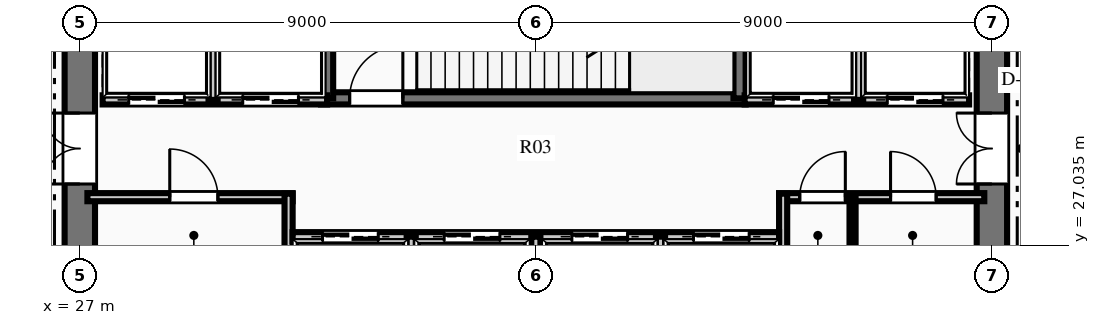
"""IFC4 building model, lengths in metres.
Left out: names, types, materials, properties, quantities, classifications, styles, units other than length and angle.
Written with IfcOpenShell. Run it as: python <this file> out.ifc"""

import sys

from ifc_helpers import new_model, si_unit, direction, frame, frame_2d, origin, place, context, subcontext, project, spatial, rectangle, extrude, element, fill, save


model = new_model("IFC4")
c1 = context("Model", 3, precision=1e-05, world=origin(), true_north=direction((0.0, 1.0)))
c2 = subcontext(c1, "Body", "Model", "MODEL_VIEW")
j1 = project(units=[si_unit("LENGTHUNIT", "METRE"), si_unit("PLANEANGLEUNIT", "RADIAN")], contexts=[c1])
p1 = place(None, origin())
s1 = spatial("IfcSite", under=j1, at=p1, CompositionType="ELEMENT")
p2 = place(p1, origin())
s2 = spatial("IfcBuilding", under=s1, at=p2, CompositionType="ELEMENT")
p3 = place(p2, frame((0.0, 0.0, 16.8)))
s3 = spatial("IfcBuildingStorey", under=s2, at=p3, CompositionType="ELEMENT", Elevation=16.8)
p4 = place(p3, frame((27.0, 18.3, 0.0), z_axis=(0.0, 0.0, 1.0), x_axis=(0.0, 1.0, 0.0)))
e1 = element("IfcWall", 1, at=p4, inside=s3, PredefinedType="SHEAR", context=c2, shape_type="SweptSolid", body=[
    extrude(rectangle(XDim=15.4, YDim=0.6, at=frame_2d((7.7, 0.0))), origin(), (0.0, 0.0, 1.0), 5.4),
])
p5 = place(p4, frame((9.94, 0.0, 0.0)))
e2 = element("IfcOpeningElement", 2, at=p5, cuts=e1, PredefinedType="OPENING", context=c2, shape_type="SweptSolid", body=[
    extrude(rectangle(XDim=1.4, YDim=2.2, at=frame_2d((0.7, 1.1))), frame((0.0, 0.31, 0.0), z_axis=(0.0, -1.0, 0.0), x_axis=(1.0, 0.0, 0.0)), (0.0, 0.0, 1.0), 0.62),
])
p6 = place(p3, frame((45.0, 18.3, 0.0), z_axis=(0.0, 0.0, 1.0), x_axis=(0.0, 1.0, 0.0)))
e3 = element("IfcWall", 3, at=p6, inside=s3, PredefinedType="SHEAR", context=c2, shape_type="SweptSolid", body=[
    extrude(rectangle(XDim=15.4, YDim=0.6, at=frame_2d((7.7, 0.0))), origin(), (0.0, 0.0, 1.0), 5.4),
])
p7 = place(p6, frame((9.94, 0.0, 0.0)))
e4 = element("IfcOpeningElement", 4, at=p7, cuts=e3, PredefinedType="OPENING", context=c2, shape_type="SweptSolid", body=[
    extrude(rectangle(XDim=1.4, YDim=2.2, at=frame_2d((0.7, 1.1))), frame((0.0, 0.31, 0.0), z_axis=(0.0, -1.0, 0.0), x_axis=(1.0, 0.0, 0.0)), (0.0, 0.0, 1.0), 0.62),
])
p8 = place(p3, frame((31.76, 29.93, 0.0), z_axis=(0.0, 0.0, 1.0), x_axis=(1.0, 0.0, 0.0)))
e5 = element("IfcWall", 5, at=p8, inside=s3, PredefinedType="SHEAR", context=c2, shape_type="SweptSolid", body=[
    extrude(rectangle(XDim=8.38, YDim=0.24, at=frame_2d((4.19, 0.0))), origin(), (0.0, 0.0, 1.0), 5.4),
])
p9 = place(p8, frame((0.565, 0.0, 0.0)))
e6 = element("IfcOpeningElement", 6, at=p9, cuts=e5, PredefinedType="OPENING", context=c2, shape_type="SweptSolid", body=[
    extrude(rectangle(XDim=1.05, YDim=2.15, at=frame_2d((0.525, 1.075))), frame((0.0, 0.13, 0.0), z_axis=(0.0, -1.0, 0.0), x_axis=(1.0, 0.0, 0.0)), (0.0, 0.0, 1.0), 0.26),
])
p10 = place(p3, frame((31.88, 29.93, 0.0), z_axis=(0.0, 0.0, 1.0), x_axis=(0.0, 1.0, 0.0)))
e7 = element("IfcWall", 7, at=p10, inside=s3, PredefinedType="SHEAR", context=c2, shape_type="SweptSolid", body=[
    extrude(rectangle(XDim=3.79, YDim=0.24, at=frame_2d((1.895, 0.0))), origin(), (0.0, 0.0, 1.0), 5.4),
])
p11 = place(p3, frame((40.02, 29.93, 0.0), z_axis=(0.0, 0.0, 1.0), x_axis=(0.0, 1.0, 0.0)))
e8 = element("IfcWall", 8, at=p11, inside=s3, PredefinedType="SHEAR", context=c2, shape_type="SweptSolid", body=[
    extrude(rectangle(XDim=3.85, YDim=0.24, at=frame_2d((1.925, 0.0))), origin(), (0.0, 0.0, 1.0), 5.4),
])
p12 = place(p3, frame((27.15, 27.98, 0.0), z_axis=(0.0, 0.0, 1.0), x_axis=(1.0, 0.0, 0.0)))
e9 = element("IfcWall", 9, at=p12, inside=s3, PredefinedType="PARTITIONING", context=c2, shape_type="SweptSolid", body=[
    extrude(rectangle(XDim=4.05, YDim=0.16, at=frame_2d((2.025, 0.0))), origin(), (0.0, 0.0, 1.0), 4.98),
])
p13 = place(p12, frame((1.625, 0.0, 0.0)))
e10 = element("IfcOpeningElement", 10, at=p13, cuts=e9, PredefinedType="OPENING", context=c2, shape_type="SweptSolid", body=[
    extrude(rectangle(XDim=0.95, YDim=2.15, at=frame_2d((0.475, 1.075))), frame((0.0, 0.09, 0.0), z_axis=(0.0, -1.0, 0.0), x_axis=(1.0, 0.0, 0.0)), (0.0, 0.0, 1.0), 0.18),
])
p14 = place(p3, frame((31.12, 26.54, 0.0), z_axis=(0.0, 0.0, 1.0), x_axis=(0.0, 1.0, 0.0)))
e11 = element("IfcWall", 11, at=p14, inside=s3, PredefinedType="PARTITIONING", context=c2, shape_type="SweptSolid", body=[
    extrude(rectangle(XDim=1.51, YDim=0.16, at=frame_2d((0.755, 0.0))), origin(), (0.0, 0.0, 1.0), 4.98),
])
p15 = place(p3, frame((40.8, 27.98, 0.0), z_axis=(0.0, 0.0, 1.0), x_axis=(1.0, 0.0, 0.0)))
e12 = element("IfcWall", 12, at=p15, inside=s3, PredefinedType="PARTITIONING", context=c2, shape_type="SweptSolid", body=[
    extrude(rectangle(XDim=4.05, YDim=0.16, at=frame_2d((2.025, 0.0))), origin(), (0.0, 0.0, 1.0), 4.98),
])
p16 = place(p15, frame((0.407, 0.0, 0.0)))
e13 = element("IfcOpeningElement", 13, at=p16, cuts=e12, PredefinedType="OPENING", context=c2, shape_type="SweptSolid", body=[
    extrude(rectangle(XDim=0.9, YDim=2.15, at=frame_2d((0.45, 1.075))), frame((0.0, 0.09, 0.0), z_axis=(0.0, -1.0, 0.0), x_axis=(1.0, 0.0, 0.0)), (0.0, 0.0, 1.0), 0.18),
])
p17 = place(p15, frame((2.2, 0.0, 0.0)))
e14 = element("IfcOpeningElement", 14, at=p17, cuts=e12, PredefinedType="OPENING", context=c2, shape_type="SweptSolid", body=[
    extrude(rectangle(XDim=0.9, YDim=2.15, at=frame_2d((0.45, 1.075))), frame((0.0, 0.09, 0.0), z_axis=(0.0, -1.0, 0.0), x_axis=(1.0, 0.0, 0.0)), (0.0, 0.0, 1.0), 0.18),
])
p18 = place(p3, frame((40.88, 26.54, 0.0), z_axis=(0.0, 0.0, 1.0), x_axis=(0.0, 1.0, 0.0)))
e15 = element("IfcWall", 15, at=p18, inside=s3, PredefinedType="PARTITIONING", context=c2, shape_type="SweptSolid", body=[
    extrude(rectangle(XDim=1.51, YDim=0.16, at=frame_2d((0.755, 0.0))), origin(), (0.0, 0.0, 1.0), 4.98),
])
p19 = place(p3, frame((42.25, 26.54, 0.0), z_axis=(0.0, 0.0, 1.0), x_axis=(0.0, 1.0, 0.0)))
e16 = element("IfcWall", 16, at=p19, inside=s3, PredefinedType="PARTITIONING", context=c2, shape_type="SweptSolid", body=[
    extrude(rectangle(XDim=1.44, YDim=0.12, at=frame_2d((0.72, 0.0))), origin(), (0.0, 0.0, 1.0), 4.98),
])
p20 = place(p3, frame((27.45, 29.9, 0.0), z_axis=(0.0, 0.0, 1.0), x_axis=(1.0, 0.0, 0.0)))
e17 = element("IfcWall", 17, at=p20, inside=s3, PredefinedType="PARTITIONING", context=c2, shape_type="SweptSolid", body=[
    extrude(rectangle(XDim=4.43, YDim=0.18, at=frame_2d((2.215, 0.0))), origin(), (0.0, 0.0, 1.0), 4.98),
])
p21 = place(p20, frame((0.515, 0.0, 0.0)))
e18 = element("IfcOpeningElement", 18, at=p21, cuts=e17, PredefinedType="OPENING", context=c2, shape_type="SweptSolid", body=[
    extrude(rectangle(XDim=1.1, YDim=2.15, at=frame_2d((0.55, 1.075))), frame((0.0, 0.1, 0.0), z_axis=(0.0, -1.0, 0.0), x_axis=(1.0, 0.0, 0.0)), (0.0, 0.0, 1.0), 0.2),
])
p22 = place(p20, frame((2.765, 0.0, 0.0)))
e19 = element("IfcOpeningElement", 19, at=p22, cuts=e17, PredefinedType="OPENING", context=c2, shape_type="SweptSolid", body=[
    extrude(rectangle(XDim=1.1, YDim=2.15, at=frame_2d((0.55, 1.075))), frame((0.0, 0.1, 0.0), z_axis=(0.0, -1.0, 0.0), x_axis=(1.0, 0.0, 0.0)), (0.0, 0.0, 1.0), 0.2),
])
p23 = place(p3, frame((29.63, 29.9, 0.0), z_axis=(0.0, 0.0, 1.0), x_axis=(0.0, 1.0, 0.0)))
e20 = element("IfcWall", 20, at=p23, inside=s3, PredefinedType="PARTITIONING", context=c2, shape_type="SweptSolid", body=[
    extrude(rectangle(XDim=3.75, YDim=0.18, at=frame_2d((1.875, 0.0))), origin(), (0.0, 0.0, 1.0), 4.98),
])
p24 = place(p3, frame((40.12, 29.9, 0.0), z_axis=(0.0, 0.0, 1.0), x_axis=(1.0, 0.0, 0.0)))
e21 = element("IfcWall", 21, at=p24, inside=s3, PredefinedType="PARTITIONING", context=c2, shape_type="SweptSolid", body=[
    extrude(rectangle(XDim=4.43, YDim=0.18, at=frame_2d((2.215, 0.0))), origin(), (0.0, 0.0, 1.0), 4.98),
])
p25 = place(p24, frame((0.565, 0.0, 0.0)))
e22 = element("IfcOpeningElement", 22, at=p25, cuts=e21, PredefinedType="OPENING", context=c2, shape_type="SweptSolid", body=[
    extrude(rectangle(XDim=1.1, YDim=2.15, at=frame_2d((0.55, 1.075))), frame((0.0, 0.1, 0.0), z_axis=(0.0, -1.0, 0.0), x_axis=(1.0, 0.0, 0.0)), (0.0, 0.0, 1.0), 0.2),
])
p26 = place(p24, frame((2.815, 0.0, 0.0)))
e23 = element("IfcOpeningElement", 23, at=p26, cuts=e21, PredefinedType="OPENING", context=c2, shape_type="SweptSolid", body=[
    extrude(rectangle(XDim=1.1, YDim=2.15, at=frame_2d((0.55, 1.075))), frame((0.0, 0.1, 0.0), z_axis=(0.0, -1.0, 0.0), x_axis=(1.0, 0.0, 0.0)), (0.0, 0.0, 1.0), 0.2),
])
p27 = place(p3, frame((42.37, 29.9, 0.0), z_axis=(0.0, 0.0, 1.0), x_axis=(0.0, 1.0, 0.0)))
e24 = element("IfcWall", 24, at=p27, inside=s3, PredefinedType="PARTITIONING", context=c2, shape_type="SweptSolid", body=[
    extrude(rectangle(XDim=3.75, YDim=0.18, at=frame_2d((1.875, 0.0))), origin(), (0.0, 0.0, 1.0), 4.98),
])
p28 = place(p3, frame((31.2, 27.2, 0.0), z_axis=(0.0, 0.0, 1.0), x_axis=(1.0, 0.0, 0.0)))
e25 = element("IfcWall", 25, at=p28, inside=s3, PredefinedType="PARTITIONING", context=c2, shape_type="SweptSolid", body=[
    extrude(rectangle(XDim=9.6, YDim=0.18, at=frame_2d((4.8, 0.0))), origin(), (0.0, 0.0, 1.0), 4.98),
])
p29 = place(p28, frame((0.59, 0.0, 0.0)))
e26 = element("IfcOpeningElement", 26, at=p29, cuts=e25, PredefinedType="OPENING", context=c2, shape_type="SweptSolid", body=[
    extrude(rectangle(XDim=1.1, YDim=2.15, at=frame_2d((0.55, 1.075))), frame((0.0, 0.1, 0.0), z_axis=(0.0, -1.0, 0.0), x_axis=(1.0, 0.0, 0.0)), (0.0, 0.0, 1.0), 0.2),
])
p30 = place(p28, frame((2.99, 0.0, 0.0)))
e27 = element("IfcOpeningElement", 27, at=p30, cuts=e25, PredefinedType="OPENING", context=c2, shape_type="SweptSolid", body=[
    extrude(rectangle(XDim=1.1, YDim=2.15, at=frame_2d((0.55, 1.075))), frame((0.0, 0.1, 0.0), z_axis=(0.0, -1.0, 0.0), x_axis=(1.0, 0.0, 0.0)), (0.0, 0.0, 1.0), 0.2),
])
p31 = place(p28, frame((5.51, 0.0, 0.0)))
e28 = element("IfcOpeningElement", 28, at=p31, cuts=e25, PredefinedType="OPENING", context=c2, shape_type="SweptSolid", body=[
    extrude(rectangle(XDim=1.1, YDim=2.15, at=frame_2d((0.55, 1.075))), frame((0.0, 0.1, 0.0), z_axis=(0.0, -1.0, 0.0), x_axis=(1.0, 0.0, 0.0)), (0.0, 0.0, 1.0), 0.2),
])
p32 = place(p28, frame((7.91, 0.0, 0.0)))
e29 = element("IfcOpeningElement", 29, at=p32, cuts=e25, PredefinedType="OPENING", context=c2, shape_type="SweptSolid", body=[
    extrude(rectangle(XDim=1.1, YDim=2.15, at=frame_2d((0.55, 1.075))), frame((0.0, 0.1, 0.0), z_axis=(0.0, -1.0, 0.0), x_axis=(1.0, 0.0, 0.0)), (0.0, 0.0, 1.0), 0.2),
])
for number, where, z_axis, x_axis in (
    (30, (33.54, 25.3, 0.0), (0.0, 0.0, 1.0), (0.0, 1.0, 0.0)),
    (31, (36.0, 25.3, 0.0), (0.0, 0.0, 1.0), (0.0, 1.0, 0.0)),
    (32, (38.46, 25.3, 0.0), (0.0, 0.0, 1.0), (0.0, 1.0, 0.0)),
):
    element("IfcWall", number, at=place(p3, frame(where, z_axis=z_axis, x_axis=x_axis)), inside=s3, PredefinedType="PARTITIONING", context=c2, shape_type="SweptSolid", body=[
        extrude(rectangle(XDim=1.9, YDim=0.18, at=frame_2d((0.95, 0.0))), origin(), (0.0, 0.0, 1.0), 4.98),
    ])
p33 = place(p13, origin())
e33 = element("IfcDoor", 33, at=p33, inside=s3, OperationType="SINGLE_SWING_LEFT", PredefinedType="DOOR", context=c2, shape_type="SweptSolid", body=[
    extrude(rectangle(XDim=0.95, YDim=2.15, at=frame_2d((0.475, 1.075))), frame((0.0, 0.025, 0.0), z_axis=(0.0, -1.0, 0.0), x_axis=(1.0, 0.0, 0.0)), (0.0, 0.0, 1.0), 0.05),
])
fill(e10, e33)
p34 = place(p16, origin())
e34 = element("IfcDoor", 34, at=p34, inside=s3, OperationType="SINGLE_SWING_RIGHT", PredefinedType="DOOR", context=c2, shape_type="SweptSolid", body=[
    extrude(rectangle(XDim=0.9, YDim=2.15, at=frame_2d((0.45, 1.075))), frame((0.0, 0.025, 0.0), z_axis=(0.0, -1.0, 0.0), x_axis=(1.0, 0.0, 0.0)), (0.0, 0.0, 1.0), 0.05),
])
fill(e13, e34)
p35 = place(p17, origin())
e35 = element("IfcDoor", 35, at=p35, inside=s3, OperationType="SINGLE_SWING_LEFT", PredefinedType="DOOR", context=c2, shape_type="SweptSolid", body=[
    extrude(rectangle(XDim=0.9, YDim=2.15, at=frame_2d((0.45, 1.075))), frame((0.0, 0.025, 0.0), z_axis=(0.0, -1.0, 0.0), x_axis=(1.0, 0.0, 0.0)), (0.0, 0.0, 1.0), 0.05),
])
fill(e14, e35)
p36 = place(p9, origin())
e36 = element("IfcDoor", 36, at=p36, inside=s3, OperationType="SINGLE_SWING_RIGHT", PredefinedType="DOOR", context=c2, shape_type="SweptSolid", body=[
    extrude(rectangle(XDim=1.05, YDim=2.15, at=frame_2d((0.525, 1.075))), frame((0.0, 0.025, 0.0), z_axis=(0.0, -1.0, 0.0), x_axis=(1.0, 0.0, 0.0)), (0.0, 0.0, 1.0), 0.05),
])
fill(e6, e36)
p37 = place(p5, origin())
e37 = element("IfcDoor", 37, at=p37, inside=s3, OperationType="DOUBLE_DOOR_SINGLE_SWING", PredefinedType="DOOR", context=c2, shape_type="SweptSolid", body=[
    extrude(rectangle(XDim=1.4, YDim=2.2, at=frame_2d((0.7, 1.1))), frame((0.0, 0.025, 0.0), z_axis=(0.0, -1.0, 0.0), x_axis=(1.0, 0.0, 0.0)), (0.0, 0.0, 1.0), 0.05),
])
fill(e2, e37)
p38 = place(p7, origin())
e38 = element("IfcDoor", 38, at=p38, inside=s3, OperationType="DOUBLE_DOOR_SINGLE_SWING", PredefinedType="DOOR", context=c2, shape_type="SweptSolid", body=[
    extrude(rectangle(XDim=1.4, YDim=2.2, at=frame_2d((0.7, 1.1))), frame((0.0, 0.025, 0.0), z_axis=(0.0, -1.0, 0.0), x_axis=(1.0, 0.0, 0.0)), (0.0, 0.0, 1.0), 0.05),
])
fill(e4, e38)
p39 = place(p21, origin())
e39 = element("IfcDoor", 39, at=p39, inside=s3, OperationType="SLIDING_TO_LEFT", PredefinedType="DOOR", context=c2, shape_type="SweptSolid", body=[
    extrude(rectangle(XDim=1.1, YDim=2.15, at=frame_2d((0.55, 1.075))), frame((0.0, 0.025, 0.0), z_axis=(0.0, -1.0, 0.0), x_axis=(1.0, 0.0, 0.0)), (0.0, 0.0, 1.0), 0.05),
])
fill(e18, e39)
p40 = place(p22, origin())
e40 = element("IfcDoor", 40, at=p40, inside=s3, OperationType="SLIDING_TO_LEFT", PredefinedType="DOOR", context=c2, shape_type="SweptSolid", body=[
    extrude(rectangle(XDim=1.1, YDim=2.15, at=frame_2d((0.55, 1.075))), frame((0.0, 0.025, 0.0), z_axis=(0.0, -1.0, 0.0), x_axis=(1.0, 0.0, 0.0)), (0.0, 0.0, 1.0), 0.05),
])
fill(e19, e40)
p41 = place(p25, origin())
e41 = element("IfcDoor", 41, at=p41, inside=s3, OperationType="SLIDING_TO_LEFT", PredefinedType="DOOR", context=c2, shape_type="SweptSolid", body=[
    extrude(rectangle(XDim=1.1, YDim=2.15, at=frame_2d((0.55, 1.075))), frame((0.0, 0.025, 0.0), z_axis=(0.0, -1.0, 0.0), x_axis=(1.0, 0.0, 0.0)), (0.0, 0.0, 1.0), 0.05),
])
fill(e22, e41)
p42 = place(p26, origin())
e42 = element("IfcDoor", 42, at=p42, inside=s3, OperationType="SLIDING_TO_LEFT", PredefinedType="DOOR", context=c2, shape_type="SweptSolid", body=[
    extrude(rectangle(XDim=1.1, YDim=2.15, at=frame_2d((0.55, 1.075))), frame((0.0, 0.025, 0.0), z_axis=(0.0, -1.0, 0.0), x_axis=(1.0, 0.0, 0.0)), (0.0, 0.0, 1.0), 0.05),
])
fill(e23, e42)
p43 = place(p29, origin())
e43 = element("IfcDoor", 43, at=p43, inside=s3, OperationType="SLIDING_TO_LEFT", PredefinedType="DOOR", context=c2, shape_type="SweptSolid", body=[
    extrude(rectangle(XDim=1.1, YDim=2.15, at=frame_2d((0.55, 1.075))), frame((0.0, 0.025, 0.0), z_axis=(0.0, -1.0, 0.0), x_axis=(1.0, 0.0, 0.0)), (0.0, 0.0, 1.0), 0.05),
])
fill(e26, e43)
p44 = place(p30, origin())
e44 = element("IfcDoor", 44, at=p44, inside=s3, OperationType="SLIDING_TO_LEFT", PredefinedType="DOOR", context=c2, shape_type="SweptSolid", body=[
    extrude(rectangle(XDim=1.1, YDim=2.15, at=frame_2d((0.55, 1.075))), frame((0.0, 0.025, 0.0), z_axis=(0.0, -1.0, 0.0), x_axis=(1.0, 0.0, 0.0)), (0.0, 0.0, 1.0), 0.05),
])
fill(e27, e44)
p45 = place(p31, origin())
e45 = element("IfcDoor", 45, at=p45, inside=s3, OperationType="SLIDING_TO_LEFT", PredefinedType="DOOR", context=c2, shape_type="SweptSolid", body=[
    extrude(rectangle(XDim=1.1, YDim=2.15, at=frame_2d((0.55, 1.075))), frame((0.0, 0.025, 0.0), z_axis=(0.0, -1.0, 0.0), x_axis=(1.0, 0.0, 0.0)), (0.0, 0.0, 1.0), 0.05),
])
fill(e28, e45)
p46 = place(p32, origin())
e46 = element("IfcDoor", 46, at=p46, inside=s3, OperationType="SLIDING_TO_LEFT", PredefinedType="DOOR", context=c2, shape_type="SweptSolid", body=[
    extrude(rectangle(XDim=1.1, YDim=2.15, at=frame_2d((0.55, 1.075))), frame((0.0, 0.025, 0.0), z_axis=(0.0, -1.0, 0.0), x_axis=(1.0, 0.0, 0.0)), (0.0, 0.0, 1.0), 0.05),
])
fill(e29, e46)
save(model, sys.argv[1])
